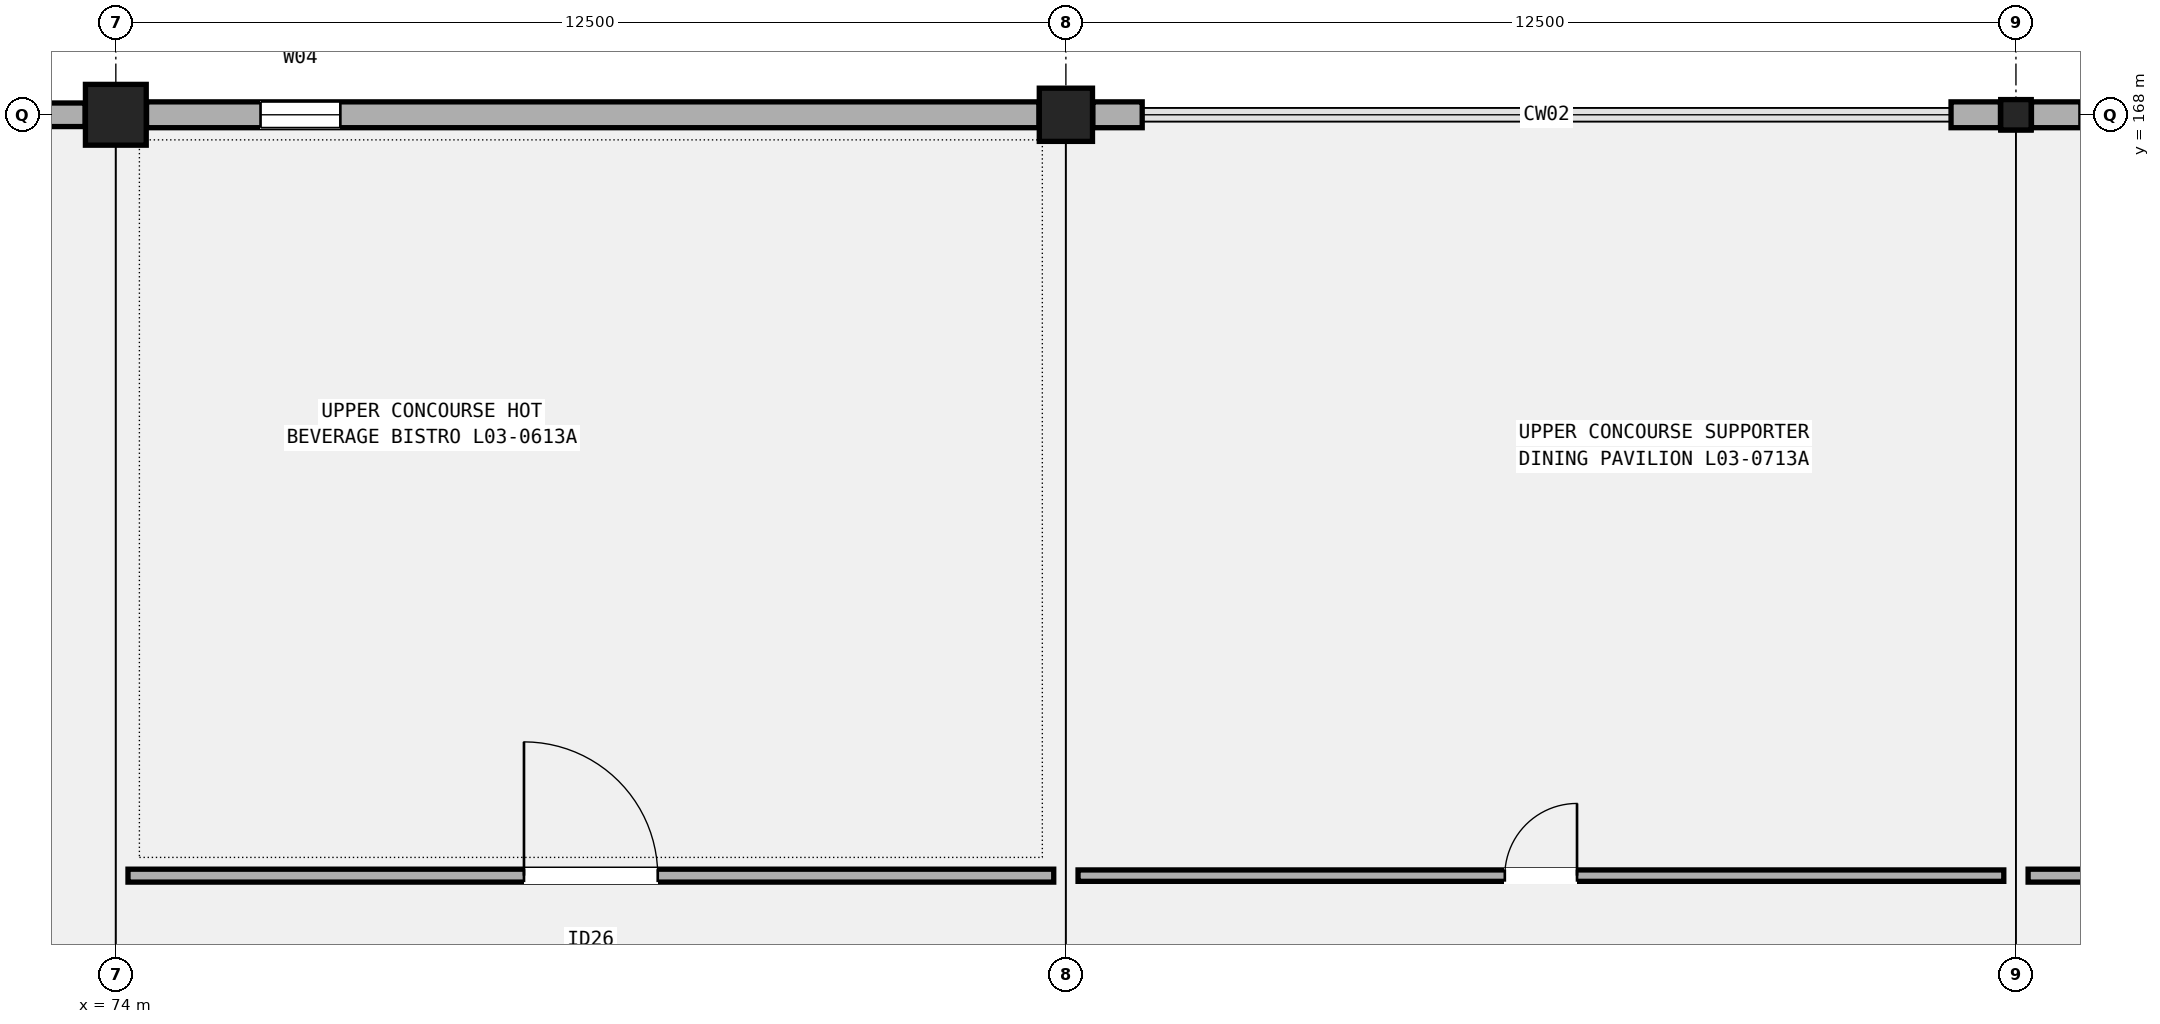
"""IFC4 building model, lengths in metres.
Left out: names, types, materials, properties, quantities, classifications, styles, units other than length and angle.
Written with IfcOpenShell. Run it as: python <this file> out.ifc"""

import sys

from ifc_helpers import new_model, si_unit, direction, frame, frame_2d, origin, origin_2d, place, context, subcontext, project, spatial, rectangle, hollow_rectangle, extrude, element, fill, save


model = new_model("IFC4")
c1 = context("Model", 3, precision=1e-05, world=origin(), true_north=direction((0.0, 1.0)))
c2 = subcontext(c1, "Body", "Model", "MODEL_VIEW")
j1 = project(units=[si_unit("LENGTHUNIT", "METRE"), si_unit("PLANEANGLEUNIT", "RADIAN")], contexts=[c1])
p1 = place(None, origin())
s1 = spatial("IfcSite", under=j1, at=p1, CompositionType="ELEMENT")
p2 = place(p1, origin())
s2 = spatial("IfcBuilding", under=s1, at=p2, CompositionType="ELEMENT")
p3 = place(p2, frame((0.0, 0.0, 15.3)))
s3 = spatial("IfcBuildingStorey", under=s2, at=p3, CompositionType="ELEMENT", Elevation=15.3)
p4 = place(p3, frame((74.0, 168.0, 0.0), z_axis=(0.0, 0.0, 1.0), x_axis=(1.0, 0.0, 0.0)))
e1 = element("IfcColumn", 1, at=p4, inside=s3, PredefinedType="COLUMN", context=c2, shape_type="SweptSolid", body=[
    extrude(rectangle(XDim=0.8, YDim=0.8, at=origin_2d()), origin(), (0.0, 0.0, 1.0), 5.1),
])
p5 = place(p3, frame((86.5, 168.0, 0.0), z_axis=(0.0, 0.0, 1.0), x_axis=(1.0, 0.0, 0.0)))
e2 = element("IfcColumn", 2, at=p5, inside=s3, PredefinedType="COLUMN", context=c2, shape_type="SweptSolid", body=[
    extrude(rectangle(XDim=0.7, YDim=0.7, at=origin_2d()), origin(), (0.0, 0.0, 1.0), 5.1),
])
p6 = place(p3, frame((99.0, 168.0, 0.0), z_axis=(0.0, 0.0, 1.0), x_axis=(1.0, 0.0, 0.0)))
e3 = element("IfcColumn", 3, at=p6, inside=s3, PredefinedType="COLUMN", context=c2, shape_type="SweptSolid", body=[
    extrude(hollow_rectangle(XDim=0.4, YDim=0.4, WallThickness=0.016, InnerFilletRadius=0.016, OuterFilletRadius=0.032, at=origin_2d()), origin(), (0.0, 0.0, 1.0), 5.1),
])
p7 = place(p3, frame((61.679, 168.0, 0.0), z_axis=(0.0, 0.0, 1.0), x_axis=(1.0, 0.0, 0.0)))
e4 = element("IfcWall", 4, at=p7, inside=s3, PredefinedType="SOLIDWALL", context=c2, shape_type="SweptSolid", body=[
    extrude(rectangle(XDim=11.917, YDim=0.31, at=frame_2d((5.958, 0.0))), origin(), (0.0, 0.0, 1.0), 4.16),
])
p8 = place(p7, frame((2.75, 0.0, 0.95)))
e5 = element("IfcOpeningElement", 5, at=p8, cuts=e4, PredefinedType="OPENING", context=c2, shape_type="SweptSolid", body=[
    extrude(rectangle(XDim=0.9, YDim=2.1, at=frame_2d((0.45, 1.05))), frame((0.0, 0.165, 0.0), z_axis=(0.0, -1.0, 0.0), x_axis=(1.0, 0.0, 0.0)), (0.0, 0.0, 1.0), 0.33),
])
p9 = place(p3, frame((74.404, 168.0, 0.0), z_axis=(0.0, 0.0, 1.0), x_axis=(1.0, 0.0, 0.0)))
e6 = element("IfcWall", 6, at=p9, inside=s3, PredefinedType="SOLIDWALL", context=c2, shape_type="SweptSolid", body=[
    extrude(rectangle(XDim=11.742, YDim=0.34, at=frame_2d((5.871, 0.0))), origin(), (0.0, 0.0, 1.0), 4.172),
])
p10 = place(p9, frame((1.5, 0.0, 0.95)))
e7 = element("IfcOpeningElement", 7, at=p10, cuts=e6, PredefinedType="OPENING", context=c2, shape_type="SweptSolid", body=[
    extrude(rectangle(XDim=1.05, YDim=2.2, at=frame_2d((0.525, 1.1))), frame((0.0, 0.18, 0.0), z_axis=(0.0, -1.0, 0.0), x_axis=(1.0, 0.0, 0.0)), (0.0, 0.0, 1.0), 0.36),
])
for number, where, z_axis, x_axis in (
    (8, (86.854, 168.0, 0.0), (0.0, 0.0, 1.0), (1.0, 0.0, 0.0)),
    (9, (98.146, 168.0, 0.0), (0.0, 0.0, 1.0), (1.0, 0.0, 0.0)),
):
    element("IfcWall", number, at=place(p3, frame(where, z_axis=z_axis, x_axis=x_axis)), inside=s3, PredefinedType="SOLIDWALL", context=c2, shape_type="SweptSolid", body=[
        extrude(rectangle(XDim=0.65, YDim=0.34, at=frame_2d((0.325, 0.0))), origin(), (0.0, 0.0, 1.0), 4.06),
    ])
p11 = place(p3, frame((99.204, 168.0, 0.0), z_axis=(0.0, 0.0, 1.0), x_axis=(1.0, 0.0, 0.0)))
e10 = element("IfcWall", 10, at=p11, inside=s3, PredefinedType="SOLIDWALL", context=c2, shape_type="SweptSolid", body=[
    extrude(rectangle(XDim=0.65, YDim=0.34, at=frame_2d((0.325, 0.0))), origin(), (0.0, 0.0, 1.0), 4.16),
])
p12 = place(p3, frame((74.16, 157.99, 0.0), z_axis=(0.0, 0.0, 1.0), x_axis=(1.0, 0.0, 0.0)))
e11 = element("IfcWall", 11, at=p12, inside=s3, PredefinedType="PARTITIONING", context=c2, shape_type="SweptSolid", body=[
    extrude(rectangle(XDim=12.18, YDim=0.17, at=frame_2d((6.09, 0.0))), origin(), (0.0, 0.0, 1.0), 4.22),
])
p13 = place(p12, frame((5.21, 0.0, 0.0)))
e12 = element("IfcOpeningElement", 12, at=p13, cuts=e11, PredefinedType="OPENING", context=c2, shape_type="SweptSolid", body=[
    extrude(rectangle(XDim=1.76, YDim=2.3, at=frame_2d((0.88, 1.15))), frame((0.0, 0.095, 0.0), z_axis=(0.0, -1.0, 0.0), x_axis=(1.0, 0.0, 0.0)), (0.0, 0.0, 1.0), 0.19),
])
p14 = place(p3, frame((86.66, 157.99, 0.0), z_axis=(0.0, 0.0, 1.0), x_axis=(1.0, 0.0, 0.0)))
e13 = element("IfcWall", 13, at=p14, inside=s3, PredefinedType="PARTITIONING", context=c2, shape_type="SweptSolid", body=[
    extrude(rectangle(XDim=12.18, YDim=0.15, at=frame_2d((6.09, 0.0))), origin(), (0.0, 0.0, 1.0), 4.22),
])
p15 = place(p14, frame((5.615, 0.0, 0.0)))
e14 = element("IfcOpeningElement", 14, at=p15, cuts=e13, PredefinedType="OPENING", context=c2, shape_type="SweptSolid", body=[
    extrude(rectangle(XDim=0.95, YDim=2.12, at=frame_2d((0.475, 1.06))), frame((0.0, 0.085, 0.0), z_axis=(0.0, -1.0, 0.0), x_axis=(1.0, 0.0, 0.0)), (0.0, 0.0, 1.0), 0.17),
])
p16 = place(p3, frame((99.16, 157.99, 0.0), z_axis=(0.0, 0.0, 1.0), x_axis=(1.0, 0.0, 0.0)))
e15 = element("IfcWall", 15, at=p16, inside=s3, PredefinedType="PARTITIONING", context=c2, shape_type="SweptSolid", body=[
    extrude(rectangle(XDim=12.68, YDim=0.17, at=frame_2d((6.34, 0.0))), origin(), (0.0, 0.0, 1.0), 4.22),
])
p17 = place(p16, frame((5.81, 0.0, 0.0)))
e16 = element("IfcOpeningElement", 16, at=p17, cuts=e15, PredefinedType="OPENING", context=c2, shape_type="SweptSolid", body=[
    extrude(rectangle(XDim=1.06, YDim=2.15, at=frame_2d((0.53, 1.075))), frame((0.0, 0.095, 0.0), z_axis=(0.0, -1.0, 0.0), x_axis=(1.0, 0.0, 0.0)), (0.0, 0.0, 1.0), 0.19),
])
p18 = place(p10, origin())
e17 = element("IfcWindow", 17, at=p18, inside=s3, PartitioningType="SINGLE_PANEL", PredefinedType="WINDOW", context=c2, shape_type="SweptSolid", body=[
    extrude(rectangle(XDim=1.05, YDim=2.2, at=frame_2d((0.525, 1.1))), frame((0.0, 0.03, 0.0), z_axis=(0.0, -1.0, 0.0), x_axis=(1.0, 0.0, 0.0)), (0.0, 0.0, 1.0), 0.06),
])
fill(e7, e17)
p19 = place(p13, origin())
e18 = element("IfcDoor", 18, at=p19, inside=s3, OperationType="SINGLE_SWING_LEFT", PredefinedType="DOOR", context=c2, shape_type="SweptSolid", body=[
    extrude(rectangle(XDim=1.76, YDim=2.3, at=frame_2d((0.88, 1.15))), frame((0.0, 0.025, 0.0), z_axis=(0.0, -1.0, 0.0), x_axis=(1.0, 0.0, 0.0)), (0.0, 0.0, 1.0), 0.05),
])
fill(e12, e18)
p20 = place(p15, origin())
e19 = element("IfcDoor", 19, at=p20, inside=s3, OperationType="SINGLE_SWING_RIGHT", PredefinedType="DOOR", context=c2, shape_type="SweptSolid", body=[
    extrude(rectangle(XDim=0.95, YDim=2.12, at=frame_2d((0.475, 1.06))), frame((0.0, 0.025, 0.0), z_axis=(0.0, -1.0, 0.0), x_axis=(1.0, 0.0, 0.0)), (0.0, 0.0, 1.0), 0.05),
])
fill(e14, e19)
save(model, sys.argv[1])
